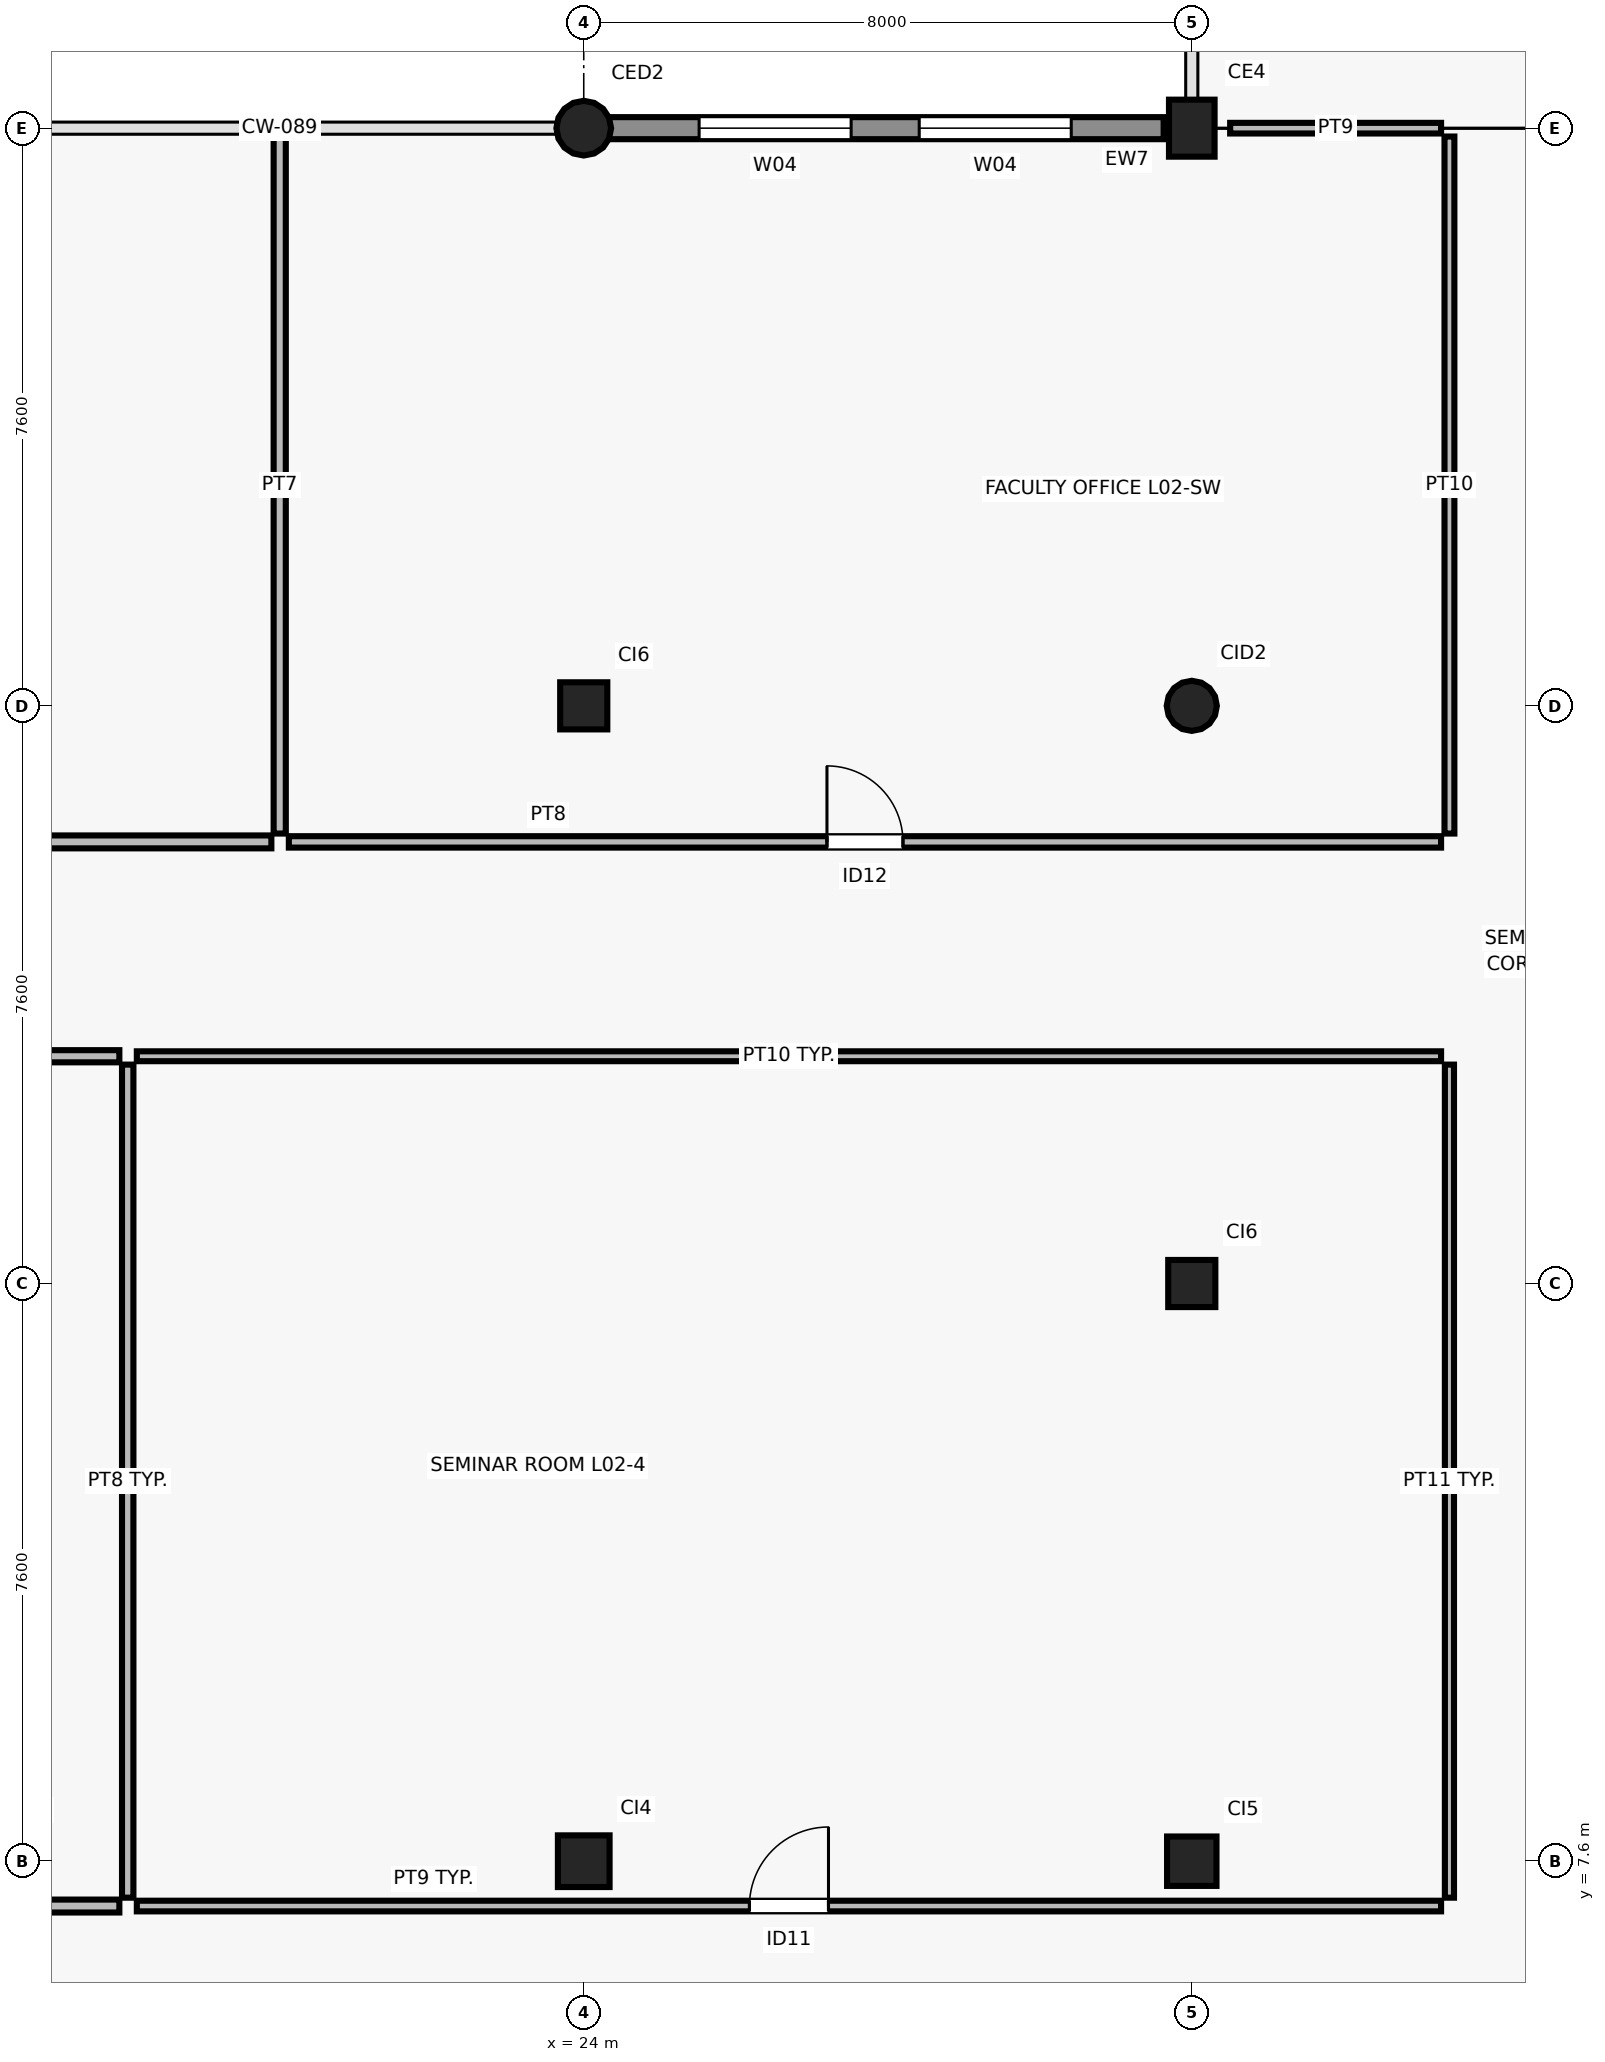
"""IFC4 building model, lengths in metres.
Left out: names, types, materials, properties, quantities, classifications, styles, units other than length and angle.
Written with IfcOpenShell. Run it as: python <this file> out.ifc"""

import sys

from ifc_helpers import new_model, si_unit, direction, frame, frame_2d, origin, origin_2d, place, context, subcontext, project, spatial, rectangle, circle, extrude, element, fill, save


model = new_model("IFC4")
c1 = context("Model", 3, precision=1e-05, world=origin(), true_north=direction((0.0, 1.0)))
c2 = subcontext(c1, "Body", "Model", "MODEL_VIEW")
j1 = project(units=[si_unit("LENGTHUNIT", "METRE"), si_unit("PLANEANGLEUNIT", "RADIAN")], contexts=[c1])
p1 = place(None, origin())
s1 = spatial("IfcSite", under=j1, at=p1, CompositionType="ELEMENT")
p2 = place(p1, origin())
s2 = spatial("IfcBuilding", under=s1, at=p2, CompositionType="ELEMENT")
p3 = place(p2, frame((0.0, 0.0, 9.0)))
s3 = spatial("IfcBuildingStorey", under=s2, at=p3, CompositionType="ELEMENT", Elevation=9.0)
p4 = place(p3, frame((24.0, 7.6, 0.0), z_axis=(0.0, 0.0, 1.0), x_axis=(1.0, 0.0, 0.0)))
e1 = element("IfcColumn", 1, at=p4, inside=s3, PredefinedType="COLUMN", context=c2, shape_type="SweptSolid", body=[
    extrude(rectangle(XDim=0.68, YDim=0.68, at=origin_2d()), origin(), (0.0, 0.0, 1.0), 4.2),
])
p5 = place(p3, frame((24.0, 22.8, 0.0), z_axis=(0.0, 0.0, 1.0), x_axis=(1.0, 0.0, 0.0)))
e2 = element("IfcColumn", 2, at=p5, inside=s3, PredefinedType="COLUMN", context=c2, shape_type="SweptSolid", body=[
    extrude(rectangle(XDim=0.62, YDim=0.62, at=origin_2d()), origin(), (0.0, 0.0, 1.0), 4.2),
])
p6 = place(p3, frame((24.0, 30.4, 0.0), z_axis=(0.0, 0.0, 1.0), x_axis=(1.0, 0.0, 0.0)))
e3 = element("IfcColumn", 3, at=p6, inside=s3, PredefinedType="COLUMN", context=c2, shape_type="SweptSolid", body=[
    extrude(circle(Radius=0.36, at=origin_2d()), origin(), (0.0, 0.0, 1.0), 4.2),
])
p7 = place(p3, frame((32.0, 7.6, 0.0), z_axis=(0.0, 0.0, 1.0), x_axis=(1.0, 0.0, 0.0)))
e4 = element("IfcColumn", 4, at=p7, inside=s3, PredefinedType="COLUMN", context=c2, shape_type="SweptSolid", body=[
    extrude(rectangle(XDim=0.65, YDim=0.65, at=origin_2d()), origin(), (0.0, 0.0, 1.0), 4.2),
])
p8 = place(p3, frame((32.0, 15.2, 0.0), z_axis=(0.0, 0.0, 1.0), x_axis=(1.0, 0.0, 0.0)))
e5 = element("IfcColumn", 5, at=p8, inside=s3, PredefinedType="COLUMN", context=c2, shape_type="SweptSolid", body=[
    extrude(rectangle(XDim=0.62, YDim=0.62, at=origin_2d()), origin(), (0.0, 0.0, 1.0), 4.2),
])
p9 = place(p3, frame((32.0, 22.8, 0.0), z_axis=(0.0, 0.0, 1.0), x_axis=(1.0, 0.0, 0.0)))
e6 = element("IfcColumn", 6, at=p9, inside=s3, PredefinedType="COLUMN", context=c2, shape_type="SweptSolid", body=[
    extrude(circle(Radius=0.33, at=origin_2d()), origin(), (0.0, 0.0, 1.0), 4.2),
])
p10 = place(p3, frame((32.0, 30.4, 0.0), z_axis=(0.0, 0.0, 1.0), x_axis=(1.0, 0.0, 0.0)))
e7 = element("IfcColumn", 7, at=p10, inside=s3, PredefinedType="COLUMN", context=c2, shape_type="SweptSolid", body=[
    extrude(rectangle(XDim=0.75, YDim=0.6, at=origin_2d()), origin(), (0.0, 0.0, 1.0), 4.2),
])
p11 = place(p3, frame((31.63, 30.4, 0.0), z_axis=(0.0, 0.0, 1.0), x_axis=(-1.0, 0.0, 0.0)))
e8 = element("IfcWall", 8, at=p11, inside=s3, PredefinedType="SOLIDWALL", context=c2, shape_type="SweptSolid", body=[
    extrude(rectangle(XDim=7.327, YDim=0.29, at=frame_2d((3.664, 0.0))), origin(), (0.0, 0.0, 1.0), 3.42),
])
p12 = place(p11, frame((1.216, 0.0, 0.9)))
e9 = element("IfcOpeningElement", 9, at=p12, cuts=e8, PredefinedType="OPENING", context=c2, shape_type="SweptSolid", body=[
    extrude(rectangle(XDim=2.0, YDim=1.8, at=frame_2d((1.0, 0.9))), frame((0.0, 0.155, 0.0), z_axis=(0.0, -1.0, 0.0), x_axis=(1.0, 0.0, 0.0)), (0.0, 0.0, 1.0), 0.31),
])
p13 = place(p11, frame((4.112, 0.0, 0.9)))
e10 = element("IfcOpeningElement", 10, at=p13, cuts=e8, PredefinedType="OPENING", context=c2, shape_type="SweptSolid", body=[
    extrude(rectangle(XDim=2.0, YDim=1.8, at=frame_2d((1.0, 0.9))), frame((0.0, 0.155, 0.0), z_axis=(0.0, -1.0, 0.0), x_axis=(1.0, 0.0, 0.0)), (0.0, 0.0, 1.0), 0.31),
])
p14 = place(p3, frame((0.11, 7.01, 0.0), z_axis=(0.0, 0.0, 1.0), x_axis=(1.0, 0.0, 0.0)))
e11 = element("IfcWall", 11, at=p14, inside=s3, PredefinedType="PARTITIONING", context=c2, shape_type="SweptSolid", body=[
    extrude(rectangle(XDim=17.78, YDim=0.17, at=frame_2d((8.89, 0.0))), origin(), (0.0, 0.0, 1.0), 3.9),
])
p15 = place(p14, frame((9.772, 0.0, 0.0)))
e12 = element("IfcOpeningElement", 12, at=p15, cuts=e11, PredefinedType="OPENING", context=c2, shape_type="SweptSolid", body=[
    extrude(rectangle(XDim=1.08, YDim=2.15, at=frame_2d((0.54, 1.075))), frame((0.0, 0.095, 0.0), z_axis=(0.0, -1.0, 0.0), x_axis=(1.0, 0.0, 0.0)), (0.0, 0.0, 1.0), 0.19),
])
p16 = place(p3, frame((0.11, 18.19, 0.0), z_axis=(0.0, 0.0, 1.0), x_axis=(1.0, 0.0, 0.0)))
e13 = element("IfcWall", 13, at=p16, inside=s3, PredefinedType="PARTITIONING", context=c2, shape_type="SweptSolid", body=[
    extrude(rectangle(XDim=17.78, YDim=0.16, at=frame_2d((8.89, 0.0))), origin(), (0.0, 0.0, 1.0), 3.9),
])
p17 = place(p3, frame((18.0, 7.12, 0.0), z_axis=(0.0, 0.0, 1.0), x_axis=(0.0, 1.0, 0.0)))
e14 = element("IfcWall", 14, at=p17, inside=s3, PredefinedType="PARTITIONING", context=c2, shape_type="SweptSolid", body=[
    extrude(rectangle(XDim=10.96, YDim=0.15, at=frame_2d((5.48, 0.0))), origin(), (0.0, 0.0, 1.0), 3.9),
])
p18 = place(p3, frame((18.12, 7.01, 0.0), z_axis=(0.0, 0.0, 1.0), x_axis=(1.0, 0.0, 0.0)))
e15 = element("IfcWall", 15, at=p18, inside=s3, PredefinedType="PARTITIONING", context=c2, shape_type="SweptSolid", body=[
    extrude(rectangle(XDim=17.16, YDim=0.14, at=frame_2d((8.58, 0.0))), origin(), (0.0, 0.0, 1.0), 3.9),
])
p19 = place(p18, frame((8.06, 0.0, 0.0)))
e16 = element("IfcOpeningElement", 16, at=p19, cuts=e15, PredefinedType="OPENING", context=c2, shape_type="SweptSolid", body=[
    extrude(rectangle(XDim=1.04, YDim=2.15, at=frame_2d((0.52, 1.075))), frame((0.0, 0.08, 0.0), z_axis=(0.0, -1.0, 0.0), x_axis=(1.0, 0.0, 0.0)), (0.0, 0.0, 1.0), 0.16),
])
p20 = place(p3, frame((18.12, 18.19, 0.0), z_axis=(0.0, 0.0, 1.0), x_axis=(1.0, 0.0, 0.0)))
e17 = element("IfcWall", 17, at=p20, inside=s3, PredefinedType="PARTITIONING", context=c2, shape_type="SweptSolid", body=[
    extrude(rectangle(XDim=17.16, YDim=0.13, at=frame_2d((8.58, 0.0))), origin(), (0.0, 0.0, 1.0), 3.9),
])
p21 = place(p3, frame((35.39, 7.12, 0.0), z_axis=(0.0, 0.0, 1.0), x_axis=(0.0, 1.0, 0.0)))
e18 = element("IfcWall", 18, at=p21, inside=s3, PredefinedType="PARTITIONING", context=c2, shape_type="SweptSolid", body=[
    extrude(rectangle(XDim=10.96, YDim=0.12, at=frame_2d((5.48, 0.0))), origin(), (0.0, 0.0, 1.0), 3.9),
])
p22 = place(p3, frame((0.11, 21.01, 0.0), z_axis=(0.0, 0.0, 1.0), x_axis=(1.0, 0.0, 0.0)))
e19 = element("IfcWall", 19, at=p22, inside=s3, PredefinedType="PARTITIONING", context=c2, shape_type="SweptSolid", body=[
    extrude(rectangle(XDim=19.78, YDim=0.17, at=frame_2d((9.89, 0.0))), origin(), (0.0, 0.0, 1.0), 3.9),
])
p23 = place(p22, frame((9.37, 0.0, 0.0)))
e20 = element("IfcOpeningElement", 20, at=p23, cuts=e19, PredefinedType="OPENING", context=c2, shape_type="SweptSolid", body=[
    extrude(rectangle(XDim=1.04, YDim=2.15, at=frame_2d((0.52, 1.075))), frame((0.0, 0.095, 0.0), z_axis=(0.0, -1.0, 0.0), x_axis=(1.0, 0.0, 0.0)), (0.0, 0.0, 1.0), 0.19),
])
p24 = place(p3, frame((20.0, 21.12, 0.0), z_axis=(0.0, 0.0, 1.0), x_axis=(0.0, 1.0, 0.0)))
e21 = element("IfcWall", 21, at=p24, inside=s3, PredefinedType="PARTITIONING", context=c2, shape_type="SweptSolid", body=[
    extrude(rectangle(XDim=9.17, YDim=0.16, at=frame_2d((4.585, 0.0))), origin(), (0.0, 0.0, 1.0), 3.9),
])
p25 = place(p3, frame((20.12, 21.01, 0.0), z_axis=(0.0, 0.0, 1.0), x_axis=(1.0, 0.0, 0.0)))
e22 = element("IfcWall", 22, at=p25, inside=s3, PredefinedType="PARTITIONING", context=c2, shape_type="SweptSolid", body=[
    extrude(rectangle(XDim=15.16, YDim=0.15, at=frame_2d((7.58, 0.0))), origin(), (0.0, 0.0, 1.0), 3.9),
])
p26 = place(p25, frame((7.08, 0.0, 0.0)))
e23 = element("IfcOpeningElement", 23, at=p26, cuts=e22, PredefinedType="OPENING", context=c2, shape_type="SweptSolid", body=[
    extrude(rectangle(XDim=1.0, YDim=2.15, at=frame_2d((0.5, 1.075))), frame((0.0, 0.085, 0.0), z_axis=(0.0, -1.0, 0.0), x_axis=(1.0, 0.0, 0.0)), (0.0, 0.0, 1.0), 0.17),
])
p27 = place(p3, frame((32.505, 30.4, 0.0), z_axis=(0.0, 0.0, 1.0), x_axis=(1.0, 0.0, 0.0)))
e24 = element("IfcWall", 24, at=p27, inside=s3, PredefinedType="PARTITIONING", context=c2, shape_type="SweptSolid", body=[
    extrude(rectangle(XDim=2.775, YDim=0.14, at=frame_2d((1.388, 0.0))), origin(), (0.0, 0.0, 1.0), 3.17),
])
p28 = place(p3, frame((35.39, 21.12, 0.0), z_axis=(0.0, 0.0, 1.0), x_axis=(0.0, 1.0, 0.0)))
e25 = element("IfcWall", 25, at=p28, inside=s3, PredefinedType="PARTITIONING", context=c2, shape_type="SweptSolid", body=[
    extrude(rectangle(XDim=9.17, YDim=0.13, at=frame_2d((4.585, 0.0))), origin(), (0.0, 0.0, 1.0), 3.9),
])
p29 = place(p12, origin())
e26 = element("IfcWindow", 26, at=p29, inside=s3, PartitioningType="SINGLE_PANEL", PredefinedType="WINDOW", context=c2, shape_type="SweptSolid", body=[
    extrude(rectangle(XDim=2.0, YDim=1.8, at=frame_2d((1.0, 0.9))), frame((0.0, 0.03, 0.0), z_axis=(0.0, -1.0, 0.0), x_axis=(1.0, 0.0, 0.0)), (0.0, 0.0, 1.0), 0.06),
])
fill(e9, e26)
p30 = place(p13, origin())
e27 = element("IfcWindow", 27, at=p30, inside=s3, PartitioningType="SINGLE_PANEL", PredefinedType="WINDOW", context=c2, shape_type="SweptSolid", body=[
    extrude(rectangle(XDim=2.0, YDim=1.8, at=frame_2d((1.0, 0.9))), frame((0.0, 0.03, 0.0), z_axis=(0.0, -1.0, 0.0), x_axis=(1.0, 0.0, 0.0)), (0.0, 0.0, 1.0), 0.06),
])
fill(e10, e27)
p31 = place(p19, origin())
e28 = element("IfcDoor", 28, at=p31, inside=s3, OperationType="SINGLE_SWING_RIGHT", PredefinedType="DOOR", context=c2, shape_type="SweptSolid", body=[
    extrude(rectangle(XDim=1.04, YDim=2.15, at=frame_2d((0.52, 1.075))), frame((0.0, 0.025, 0.0), z_axis=(0.0, -1.0, 0.0), x_axis=(1.0, 0.0, 0.0)), (0.0, 0.0, 1.0), 0.05),
])
fill(e16, e28)
p32 = place(p26, origin())
e29 = element("IfcDoor", 29, at=p32, inside=s3, OperationType="SINGLE_SWING_LEFT", PredefinedType="DOOR", context=c2, shape_type="SweptSolid", body=[
    extrude(rectangle(XDim=1.0, YDim=2.15, at=frame_2d((0.5, 1.075))), frame((0.0, 0.025, 0.0), z_axis=(0.0, -1.0, 0.0), x_axis=(1.0, 0.0, 0.0)), (0.0, 0.0, 1.0), 0.05),
])
fill(e23, e29)
save(model, sys.argv[1])
